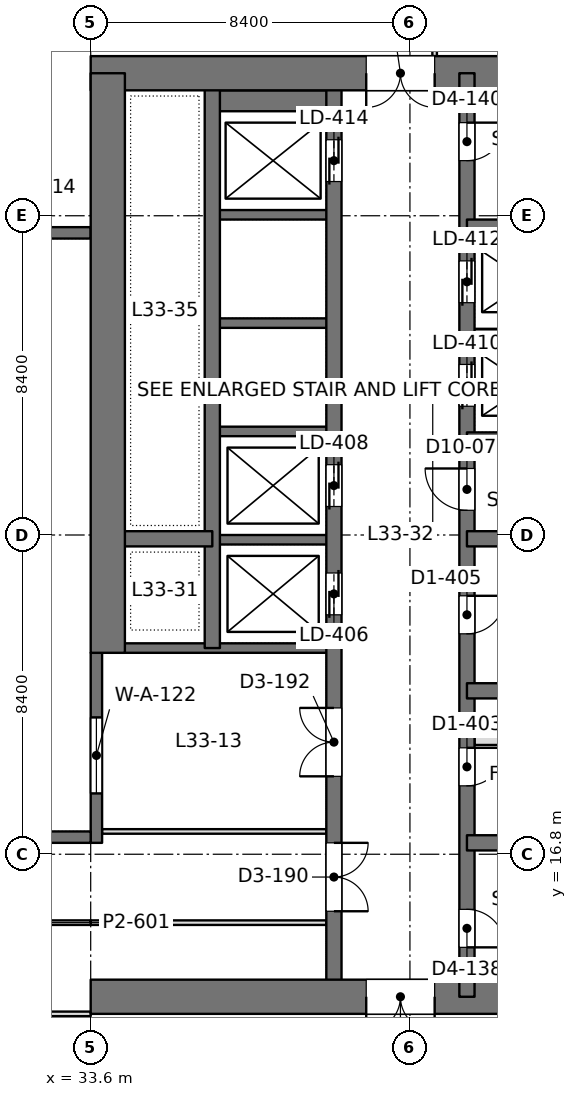
"""IFC4 building model, lengths in metres.
Left out: names, types, materials, properties, quantities, classifications, styles, units other than length and angle.
Written with IfcOpenShell. Run it as: python <this file> out.ifc"""

import sys

from ifc_helpers import new_model, si_unit, direction, frame, frame_2d, origin, place, context, subcontext, project, spatial, rectangle, extrude, element, fill, save


model = new_model("IFC4")
c1 = context("Model", 3, precision=1e-05, world=origin(), true_north=direction((0.0, 1.0)))
c2 = subcontext(c1, "Body", "Model", "MODEL_VIEW")
j1 = project(units=[si_unit("LENGTHUNIT", "METRE"), si_unit("PLANEANGLEUNIT", "RADIAN")], contexts=[c1])
p1 = place(None, origin())
s1 = spatial("IfcSite", under=j1, at=p1, CompositionType="ELEMENT")
p2 = place(p1, origin())
s2 = spatial("IfcBuilding", under=s1, at=p2, CompositionType="ELEMENT")
p3 = place(p2, frame((0.0, 0.0, 147.0)))
s3 = spatial("IfcBuildingStorey", under=s2, at=p3, CompositionType="ELEMENT", Elevation=147.0)
p4 = place(p3, frame((33.6, 13.05, 0.0), z_axis=(0.0, 0.0, 1.0), x_axis=(1.0, 0.0, 0.0)))
e1 = element("IfcWall", 1, at=p4, inside=s3, PredefinedType="SHEAR", context=c2, shape_type="SweptSolid", body=[
    extrude(rectangle(XDim=18.0, YDim=0.9, at=frame_2d((9.0, 0.0))), origin(), (0.0, 0.0, 1.0), 4.2),
])
p5 = place(p4, frame((7.25, 0.0, 0.0)))
e2 = element("IfcOpeningElement", 2, at=p5, cuts=e1, PredefinedType="OPENING", context=c2, shape_type="SweptSolid", body=[
    extrude(rectangle(XDim=1.8, YDim=2.4, at=frame_2d((0.9, 1.2))), frame((0.0, 0.46, 0.0), z_axis=(0.0, -1.0, 0.0), x_axis=(1.0, 0.0, 0.0)), (0.0, 0.0, 1.0), 0.92),
])
p6 = place(p3, frame((33.6, 37.35, 0.0), z_axis=(0.0, 0.0, 1.0), x_axis=(1.0, 0.0, 0.0)))
e3 = element("IfcWall", 3, at=p6, inside=s3, PredefinedType="SHEAR", context=c2, shape_type="SweptSolid", body=[
    extrude(rectangle(XDim=18.0, YDim=0.9, at=frame_2d((9.0, 0.0))), origin(), (0.0, 0.0, 1.0), 4.2),
])
p7 = place(p6, frame((7.25, 0.0, 0.0)))
e4 = element("IfcOpeningElement", 4, at=p7, cuts=e3, PredefinedType="OPENING", context=c2, shape_type="SweptSolid", body=[
    extrude(rectangle(XDim=1.8, YDim=2.4, at=frame_2d((0.9, 1.2))), frame((0.0, 0.46, 0.0), z_axis=(0.0, -1.0, 0.0), x_axis=(1.0, 0.0, 0.0)), (0.0, 0.0, 1.0), 0.92),
])
p8 = place(p3, frame((34.05, 22.1, 0.0), z_axis=(0.0, 0.0, 1.0), x_axis=(0.0, 1.0, 0.0)))
e5 = element("IfcWall", 5, at=p8, inside=s3, PredefinedType="SHEAR", context=c2, shape_type="SweptSolid", body=[
    extrude(rectangle(XDim=15.25, YDim=0.9, at=frame_2d((7.625, 0.0))), origin(), (0.0, 0.0, 1.0), 4.2),
])
p9 = place(p3, frame((43.5, 13.05, 0.0), z_axis=(0.0, 0.0, 1.0), x_axis=(0.0, 1.0, 0.0)))
e6 = element("IfcWall", 6, at=p9, inside=s3, PredefinedType="SHEAR", context=c2, shape_type="SweptSolid", body=[
    extrude(rectangle(XDim=24.3, YDim=0.4, at=frame_2d((12.15, 0.0))), origin(), (0.0, 0.0, 1.0), 4.2),
])
p10 = place(p9, frame((1.3, 0.0, 0.0)))
e7 = element("IfcOpeningElement", 7, at=p10, cuts=e6, PredefinedType="OPENING", context=c2, shape_type="SweptSolid", body=[
    extrude(rectangle(XDim=1.0, YDim=2.2, at=frame_2d((0.5, 1.1))), frame((0.0, 0.21, 0.0), z_axis=(0.0, -1.0, 0.0), x_axis=(1.0, 0.0, 0.0)), (0.0, 0.0, 1.0), 0.42),
])
p11 = place(p9, frame((22.0, 0.0, 0.0)))
e8 = element("IfcOpeningElement", 8, at=p11, cuts=e6, PredefinedType="OPENING", context=c2, shape_type="SweptSolid", body=[
    extrude(rectangle(XDim=1.0, YDim=2.2, at=frame_2d((0.5, 1.1))), frame((0.0, 0.21, 0.0), z_axis=(0.0, -1.0, 0.0), x_axis=(1.0, 0.0, 0.0)), (0.0, 0.0, 1.0), 0.42),
])
p12 = place(p9, frame((5.55, 0.0, 0.0)))
e9 = element("IfcOpeningElement", 9, at=p12, cuts=e6, PredefinedType="OPENING", context=c2, shape_type="SweptSolid", body=[
    extrude(rectangle(XDim=1.0, YDim=2.2, at=frame_2d((0.5, 1.1))), frame((0.0, 0.21, 0.0), z_axis=(0.0, -1.0, 0.0), x_axis=(1.0, 0.0, 0.0)), (0.0, 0.0, 1.0), 0.42),
])
p13 = place(p9, frame((9.55, 0.0, 0.0)))
e10 = element("IfcOpeningElement", 10, at=p13, cuts=e6, PredefinedType="OPENING", context=c2, shape_type="SweptSolid", body=[
    extrude(rectangle(XDim=1.0, YDim=2.2, at=frame_2d((0.5, 1.1))), frame((0.0, 0.21, 0.0), z_axis=(0.0, -1.0, 0.0), x_axis=(1.0, 0.0, 0.0)), (0.0, 0.0, 1.0), 0.42),
])
p14 = place(p9, frame((12.8, 0.0, 0.0)))
e11 = element("IfcOpeningElement", 11, at=p14, cuts=e6, PredefinedType="OPENING", context=c2, shape_type="SweptSolid", body=[
    extrude(rectangle(XDim=1.1, YDim=2.2, at=frame_2d((0.55, 1.1))), frame((0.0, 0.21, 0.0), z_axis=(0.0, -1.0, 0.0), x_axis=(1.0, 0.0, 0.0)), (0.0, 0.0, 1.0), 0.42),
])
p15 = place(p9, frame((15.538, 0.0, 0.0)))
e12 = element("IfcOpeningElement", 12, at=p15, cuts=e6, PredefinedType="OPENING", context=c2, shape_type="SweptSolid", body=[
    extrude(rectangle(XDim=1.1, YDim=2.2, at=frame_2d((0.55, 1.1))), frame((0.0, 0.21, 0.0), z_axis=(0.0, -1.0, 0.0), x_axis=(1.0, 0.0, 0.0)), (0.0, 0.0, 1.0), 0.42),
])
p16 = place(p9, frame((18.262, 0.0, 0.0)))
e13 = element("IfcOpeningElement", 13, at=p16, cuts=e6, PredefinedType="OPENING", context=c2, shape_type="SweptSolid", body=[
    extrude(rectangle(XDim=1.1, YDim=2.2, at=frame_2d((0.55, 1.1))), frame((0.0, 0.21, 0.0), z_axis=(0.0, -1.0, 0.0), x_axis=(1.0, 0.0, 0.0)), (0.0, 0.0, 1.0), 0.42),
])
p17 = place(p3, frame((40.0, 13.05, 0.0), z_axis=(0.0, 0.0, 1.0), x_axis=(0.0, 1.0, 0.0)))
e14 = element("IfcWall", 14, at=p17, inside=s3, PredefinedType="SHEAR", context=c2, shape_type="SweptSolid", body=[
    extrude(rectangle(XDim=24.3, YDim=0.4, at=frame_2d((12.15, 0.0))), origin(), (0.0, 0.0, 1.0), 4.2),
])
p18 = place(p17, frame((10.05, 0.0, 0.0)))
e15 = element("IfcOpeningElement", 15, at=p18, cuts=e14, PredefinedType="OPENING", context=c2, shape_type="SweptSolid", body=[
    extrude(rectangle(XDim=1.1, YDim=2.2, at=frame_2d((0.55, 1.1))), frame((0.0, 0.21, 0.0), z_axis=(0.0, -1.0, 0.0), x_axis=(1.0, 0.0, 0.0)), (0.0, 0.0, 1.0), 0.42),
])
p19 = place(p17, frame((12.9, 0.0, 0.0)))
e16 = element("IfcOpeningElement", 16, at=p19, cuts=e14, PredefinedType="OPENING", context=c2, shape_type="SweptSolid", body=[
    extrude(rectangle(XDim=1.1, YDim=2.2, at=frame_2d((0.55, 1.1))), frame((0.0, 0.21, 0.0), z_axis=(0.0, -1.0, 0.0), x_axis=(1.0, 0.0, 0.0)), (0.0, 0.0, 1.0), 0.42),
])
p20 = place(p17, frame((21.45, 0.0, 0.0)))
e17 = element("IfcOpeningElement", 17, at=p20, cuts=e14, PredefinedType="OPENING", context=c2, shape_type="SweptSolid", body=[
    extrude(rectangle(XDim=1.1, YDim=2.2, at=frame_2d((0.55, 1.1))), frame((0.0, 0.21, 0.0), z_axis=(0.0, -1.0, 0.0), x_axis=(1.0, 0.0, 0.0)), (0.0, 0.0, 1.0), 0.42),
])
p21 = place(p17, frame((2.25, 0.0, 0.0)))
e18 = element("IfcOpeningElement", 18, at=p21, cuts=e14, PredefinedType="OPENING", context=c2, shape_type="SweptSolid", body=[
    extrude(rectangle(XDim=1.8, YDim=2.4, at=frame_2d((0.9, 1.2))), frame((0.0, 0.21, 0.0), z_axis=(0.0, -1.0, 0.0), x_axis=(1.0, 0.0, 0.0)), (0.0, 0.0, 1.0), 0.42),
])
p22 = place(p17, frame((5.8, 0.0, 0.0)))
e19 = element("IfcOpeningElement", 19, at=p22, cuts=e14, PredefinedType="OPENING", context=c2, shape_type="SweptSolid", body=[
    extrude(rectangle(XDim=1.8, YDim=2.4, at=frame_2d((0.9, 1.2))), frame((0.0, 0.21, 0.0), z_axis=(0.0, -1.0, 0.0), x_axis=(1.0, 0.0, 0.0)), (0.0, 0.0, 1.0), 0.42),
])
p23 = place(p3, frame((36.8, 22.225, 0.0), z_axis=(0.0, 0.0, 1.0), x_axis=(0.0, 1.0, 0.0)))
e20 = element("IfcWall", 20, at=p23, inside=s3, PredefinedType="SHEAR", context=c2, shape_type="SweptSolid", body=[
    extrude(rectangle(XDim=15.125, YDim=0.4, at=frame_2d((7.562, 0.0))), origin(), (0.0, 0.0, 1.0), 4.2),
])
for number, where, z_axis, x_axis in (
    (21, (51.15, 17.1, 0.0), (0.0, 0.0, 1.0), (-1.0, 0.0, 0.0)),
    (22, (51.15, 21.1, 0.0), (0.0, 0.0, 1.0), (-1.0, 0.0, 0.0)),
    (23, (51.15, 25.1, 0.0), (0.0, 0.0, 1.0), (-1.0, 0.0, 0.0)),
    (24, (51.15, 27.7, 0.0), (0.0, 0.0, 1.0), (-1.0, 0.0, 0.0)),
    (25, (51.15, 33.3, 0.0), (0.0, 0.0, 1.0), (-1.0, 0.0, 0.0)),
):
    element("IfcWall", number, at=place(p3, frame(where, z_axis=z_axis, x_axis=x_axis)), inside=s3, PredefinedType="SHEAR", context=c2, shape_type="SweptSolid", body=[
        extrude(rectangle(XDim=7.65, YDim=0.4, at=frame_2d((3.825, 0.0))), origin(), (0.0, 0.0, 1.0), 4.2),
    ])
p24 = place(p3, frame((46.7, 30.5, 0.0), z_axis=(0.0, 0.0, 1.0), x_axis=(-1.0, 0.0, 0.0)))
e26 = element("IfcWall", 26, at=p24, inside=s3, PredefinedType="SHEAR", context=c2, shape_type="SweptSolid", body=[
    extrude(rectangle(XDim=3.2, YDim=0.25, at=frame_2d((1.6, 0.0))), origin(), (0.0, 0.0, 1.0), 4.2),
])
p25 = place(p3, frame((36.8, 25.1, 0.0), z_axis=(0.0, 0.0, 1.0), x_axis=(-1.0, 0.0, 0.0)))
e27 = element("IfcWall", 27, at=p25, inside=s3, PredefinedType="SHEAR", context=c2, shape_type="SweptSolid", body=[
    extrude(rectangle(XDim=2.75, YDim=0.4, at=frame_2d((1.375, 0.0))), origin(), (0.0, 0.0, 1.0), 4.2),
])
p26 = place(p3, frame((40.0, 22.225, 0.0), z_axis=(0.0, 0.0, 1.0), x_axis=(-1.0, 0.0, 0.0)))
e28 = element("IfcWall", 28, at=p26, inside=s3, PredefinedType="SHEAR", context=c2, shape_type="SweptSolid", body=[
    extrude(rectangle(XDim=5.95, YDim=0.25, at=frame_2d((2.975, 0.0))), origin(), (0.0, 0.0, 1.0), 4.2),
])
for number, where, z_axis, x_axis in (
    (29, (40.0, 25.075, 0.0), (0.0, 0.0, 1.0), (-1.0, 0.0, 0.0)),
    (30, (40.0, 27.925, 0.0), (0.0, 0.0, 1.0), (-1.0, 0.0, 0.0)),
    (31, (40.0, 30.775, 0.0), (0.0, 0.0, 1.0), (-1.0, 0.0, 0.0)),
    (32, (40.0, 33.625, 0.0), (0.0, 0.0, 1.0), (-1.0, 0.0, 0.0)),
):
    element("IfcWall", number, at=place(p3, frame(where, z_axis=z_axis, x_axis=x_axis)), inside=s3, PredefinedType="SHEAR", context=c2, shape_type="SweptSolid", body=[
        extrude(rectangle(XDim=3.2, YDim=0.25, at=frame_2d((1.6, 0.0))), origin(), (0.0, 0.0, 1.0), 4.2),
    ])
p27 = place(p3, frame((40.0, 36.625, 0.0), z_axis=(0.0, 0.0, 1.0), x_axis=(-1.0, 0.0, 0.0)))
e33 = element("IfcWall", 33, at=p27, inside=s3, PredefinedType="SHEAR", context=c2, shape_type="SweptSolid", body=[
    extrude(rectangle(XDim=3.2, YDim=0.55, at=frame_2d((1.6, 0.0))), origin(), (0.0, 0.0, 1.0), 4.2),
])
p28 = place(p3, frame((33.75, 17.1, 0.0), z_axis=(0.0, 0.0, 1.0), x_axis=(0.0, 1.0, 0.0)))
e34 = element("IfcWall", 34, at=p28, inside=s3, PredefinedType="SOLIDWALL", context=c2, shape_type="SweptSolid", body=[
    extrude(rectangle(XDim=5.0, YDim=0.3, at=frame_2d((2.5, 0.0))), origin(), (0.0, 0.0, 1.0), 4.05),
])
p29 = place(p28, frame((1.3, 0.0, 0.1)))
e35 = element("IfcOpeningElement", 35, at=p29, cuts=e34, PredefinedType="OPENING", context=c2, shape_type="SweptSolid", body=[
    extrude(rectangle(XDim=2.0, YDim=3.0, at=frame_2d((1.0, 1.5))), frame((0.0, 0.16, 0.0), z_axis=(0.0, -1.0, 0.0), x_axis=(1.0, 0.0, 0.0)), (0.0, 0.0, 1.0), 0.32),
])
p30 = place(p3, frame((26.025, 17.25, 0.0), z_axis=(0.0, 0.0, 1.0), x_axis=(1.0, 0.0, 0.0)))
e36 = element("IfcWall", 36, at=p30, inside=s3, PredefinedType="SOLIDWALL", context=c2, shape_type="SweptSolid", body=[
    extrude(rectangle(XDim=7.575, YDim=0.3, at=frame_2d((3.788, 0.0))), origin(), (0.0, 0.0, 1.0), 4.05),
])
p31 = place(p30, frame((0.587, 0.0, 0.1)))
e37 = element("IfcOpeningElement", 37, at=p31, cuts=e36, PredefinedType="OPENING", context=c2, shape_type="SweptSolid", body=[
    extrude(rectangle(XDim=2.0, YDim=3.0, at=frame_2d((1.0, 1.5))), frame((0.0, 0.16, 0.0), z_axis=(0.0, -1.0, 0.0), x_axis=(1.0, 0.0, 0.0)), (0.0, 0.0, 1.0), 0.32),
])
p32 = place(p30, frame((4.188, 0.0, 0.1)))
e38 = element("IfcOpeningElement", 38, at=p32, cuts=e36, PredefinedType="OPENING", context=c2, shape_type="SweptSolid", body=[
    extrude(rectangle(XDim=2.0, YDim=3.0, at=frame_2d((1.0, 1.5))), frame((0.0, 0.16, 0.0), z_axis=(0.0, -1.0, 0.0), x_axis=(1.0, 0.0, 0.0)), (0.0, 0.0, 1.0), 0.32),
])
p33 = place(p3, frame((26.025, 33.15, 0.0), z_axis=(0.0, 0.0, 1.0), x_axis=(1.0, 0.0, 0.0)))
e39 = element("IfcWall", 39, at=p33, inside=s3, PredefinedType="SOLIDWALL", context=c2, shape_type="SweptSolid", body=[
    extrude(rectangle(XDim=7.575, YDim=0.3, at=frame_2d((3.788, 0.0))), origin(), (0.0, 0.0, 1.0), 4.05),
])
p34 = place(p33, frame((0.587, 0.0, 0.1)))
e40 = element("IfcOpeningElement", 40, at=p34, cuts=e39, PredefinedType="OPENING", context=c2, shape_type="SweptSolid", body=[
    extrude(rectangle(XDim=2.0, YDim=3.0, at=frame_2d((1.0, 1.5))), frame((0.0, 0.16, 0.0), z_axis=(0.0, -1.0, 0.0), x_axis=(1.0, 0.0, 0.0)), (0.0, 0.0, 1.0), 0.32),
])
p35 = place(p33, frame((4.188, 0.0, 0.1)))
e41 = element("IfcOpeningElement", 41, at=p35, cuts=e39, PredefinedType="OPENING", context=c2, shape_type="SweptSolid", body=[
    extrude(rectangle(XDim=2.0, YDim=3.0, at=frame_2d((1.0, 1.5))), frame((0.0, 0.16, 0.0), z_axis=(0.0, -1.0, 0.0), x_axis=(1.0, 0.0, 0.0)), (0.0, 0.0, 1.0), 0.32),
])
p36 = place(p3, frame((33.898, 17.4, 0.0), z_axis=(0.0, 0.0, 1.0), x_axis=(1.0, 0.0, 0.0)))
e42 = element("IfcWall", 42, at=p36, inside=s3, PredefinedType="PARTITIONING", context=c2, shape_type="SweptSolid", body=[
    extrude(rectangle(XDim=5.904, YDim=0.12, at=frame_2d((2.952, 0.0))), origin(), (0.0, 0.0, 1.0), 3.55),
])
p37 = place(p3, frame((33.598, 15.0, 0.0), z_axis=(0.0, 0.0, 1.0), x_axis=(1.0, 0.0, 0.0)))
e43 = element("IfcWall", 43, at=p37, inside=s3, PredefinedType="PARTITIONING", context=c2, shape_type="SweptSolid", body=[
    extrude(rectangle(XDim=6.204, YDim=0.12, at=frame_2d((3.102, 0.0))), origin(), (0.0, 0.0, 1.0), 3.55),
])
p38 = place(p3, frame((16.798, 15.0, 0.0), z_axis=(0.0, 0.0, 1.0), x_axis=(1.0, 0.0, 0.0)))
e44 = element("IfcWall", 44, at=p38, inside=s3, PredefinedType="PARTITIONING", context=c2, shape_type="SweptSolid", body=[
    extrude(rectangle(XDim=16.804, YDim=0.12, at=frame_2d((8.402, 0.0))), origin(), (0.0, 0.0, 1.0), 3.55),
])
p39 = place(p38, frame((4.702, 0.0, 0.0)))
e45 = element("IfcOpeningElement", 45, at=p39, cuts=e44, PredefinedType="OPENING", context=c2, shape_type="SweptSolid", body=[
    extrude(rectangle(XDim=1.8, YDim=2.2, at=frame_2d((0.9, 1.1))), frame((0.0, 0.07, 0.0), z_axis=(0.0, -1.0, 0.0), x_axis=(1.0, 0.0, 0.0)), (0.0, 0.0, 1.0), 0.14),
])
p40 = place(p3, frame((16.8, 12.6, 0.0), z_axis=(0.0, 0.0, 1.0), x_axis=(1.0, 0.0, 0.0)))
e46 = element("IfcWall", 46, at=p40, inside=s3, PredefinedType="PARTITIONING", context=c2, shape_type="SweptSolid", body=[
    extrude(rectangle(XDim=16.8, YDim=0.12, at=frame_2d((8.4, 0.0))), origin(), (0.0, 0.0, 1.0), 3.55),
])
p41 = place(p3, frame((42.65, 37.8, 0.0), z_axis=(0.0, 0.0, 1.0), x_axis=(0.0, 1.0, 0.0)))
e47 = element("IfcWall", 47, at=p41, inside=s3, PredefinedType="PARTITIONING", context=c2, shape_type="SweptSolid", body=[
    extrude(rectangle(XDim=2.0, YDim=0.12, at=frame_2d((1.0, 0.0))), origin(), (0.0, 0.0, 1.0), 4.05),
])
p42 = place(p3, frame((43.7, 19.8, 0.0), z_axis=(0.0, 0.0, 1.0), x_axis=(1.0, 0.0, 0.0)))
e48 = element("IfcWall", 48, at=p42, inside=s3, PredefinedType="PARTITIONING", context=c2, shape_type="SweptSolid", body=[
    extrude(rectangle(XDim=6.6, YDim=0.25, at=frame_2d((3.3, 0.0))), origin(), (0.0, 0.0, 1.0), 4.0),
])
p43 = place(p42, frame((2.825, 0.0, 0.0)))
e49 = element("IfcOpeningElement", 49, at=p43, cuts=e48, PredefinedType="OPENING", context=c2, shape_type="SweptSolid", body=[
    extrude(rectangle(XDim=0.9, YDim=2.2, at=frame_2d((0.45, 1.1))), frame((0.0, 0.135, 0.0), z_axis=(0.0, -1.0, 0.0), x_axis=(1.0, 0.0, 0.0)), (0.0, 0.0, 1.0), 0.27),
])
p44 = place(p29, origin())
e50 = element("IfcWindow", 50, at=p44, inside=s3, PartitioningType="SINGLE_PANEL", PredefinedType="WINDOW", context=c2, shape_type="SweptSolid", body=[
    extrude(rectangle(XDim=2.0, YDim=3.0, at=frame_2d((1.0, 1.5))), frame((0.0, 0.03, 0.0), z_axis=(0.0, -1.0, 0.0), x_axis=(1.0, 0.0, 0.0)), (0.0, 0.0, 1.0), 0.06),
])
fill(e35, e50)
p45 = place(p5, frame((1.8, 0.0, 0.0), z_axis=(0.0, 0.0, 1.0), x_axis=(-1.0, 0.0, 0.0)))
e51 = element("IfcDoor", 51, at=p45, inside=s3, OperationType="DOUBLE_DOOR_SINGLE_SWING", PredefinedType="DOOR", context=c2, shape_type="SweptSolid", body=[
    extrude(rectangle(XDim=1.8, YDim=2.4, at=frame_2d((0.9, 1.2))), frame((0.0, 0.025, 0.0), z_axis=(0.0, -1.0, 0.0), x_axis=(1.0, 0.0, 0.0)), (0.0, 0.0, 1.0), 0.05),
])
fill(e2, e51)
p46 = place(p7, frame((1.8, 0.0, 0.0), z_axis=(0.0, 0.0, 1.0), x_axis=(-1.0, 0.0, 0.0)))
e52 = element("IfcDoor", 52, at=p46, inside=s3, OperationType="DOUBLE_DOOR_SINGLE_SWING", PredefinedType="DOOR", context=c2, shape_type="SweptSolid", body=[
    extrude(rectangle(XDim=1.8, YDim=2.4, at=frame_2d((0.9, 1.2))), frame((0.0, 0.025, 0.0), z_axis=(0.0, -1.0, 0.0), x_axis=(1.0, 0.0, 0.0)), (0.0, 0.0, 1.0), 0.05),
])
fill(e4, e52)
p47 = place(p10, frame((1.0, 0.0, 0.0), z_axis=(0.0, 0.0, 1.0), x_axis=(-1.0, 0.0, 0.0)))
e53 = element("IfcDoor", 53, at=p47, inside=s3, OperationType="SINGLE_SWING_RIGHT", PredefinedType="DOOR", context=c2, shape_type="SweptSolid", body=[
    extrude(rectangle(XDim=1.0, YDim=2.2, at=frame_2d((0.5, 1.1))), frame((0.0, 0.025, 0.0), z_axis=(0.0, -1.0, 0.0), x_axis=(1.0, 0.0, 0.0)), (0.0, 0.0, 1.0), 0.05),
])
fill(e7, e53)
p48 = place(p11, frame((1.0, 0.0, 0.0), z_axis=(0.0, 0.0, 1.0), x_axis=(-1.0, 0.0, 0.0)))
e54 = element("IfcDoor", 54, at=p48, inside=s3, OperationType="SINGLE_SWING_LEFT", PredefinedType="DOOR", context=c2, shape_type="SweptSolid", body=[
    extrude(rectangle(XDim=1.0, YDim=2.2, at=frame_2d((0.5, 1.1))), frame((0.0, 0.025, 0.0), z_axis=(0.0, -1.0, 0.0), x_axis=(1.0, 0.0, 0.0)), (0.0, 0.0, 1.0), 0.05),
])
fill(e8, e54)
p49 = place(p12, frame((1.0, 0.0, 0.0), z_axis=(0.0, 0.0, 1.0), x_axis=(-1.0, 0.0, 0.0)))
e55 = element("IfcDoor", 55, at=p49, inside=s3, OperationType="SINGLE_SWING_LEFT", PredefinedType="DOOR", context=c2, shape_type="SweptSolid", body=[
    extrude(rectangle(XDim=1.0, YDim=2.2, at=frame_2d((0.5, 1.1))), frame((0.0, 0.025, 0.0), z_axis=(0.0, -1.0, 0.0), x_axis=(1.0, 0.0, 0.0)), (0.0, 0.0, 1.0), 0.05),
])
fill(e9, e55)
p50 = place(p13, frame((1.0, 0.0, 0.0), z_axis=(0.0, 0.0, 1.0), x_axis=(-1.0, 0.0, 0.0)))
e56 = element("IfcDoor", 56, at=p50, inside=s3, OperationType="SINGLE_SWING_LEFT", PredefinedType="DOOR", context=c2, shape_type="SweptSolid", body=[
    extrude(rectangle(XDim=1.0, YDim=2.2, at=frame_2d((0.5, 1.1))), frame((0.0, 0.025, 0.0), z_axis=(0.0, -1.0, 0.0), x_axis=(1.0, 0.0, 0.0)), (0.0, 0.0, 1.0), 0.05),
])
fill(e10, e56)
p51 = place(p14, origin())
e57 = element("IfcDoor", 57, at=p51, inside=s3, OperationType="SINGLE_SWING_RIGHT", PredefinedType="DOOR", context=c2, shape_type="SweptSolid", body=[
    extrude(rectangle(XDim=1.1, YDim=2.2, at=frame_2d((0.55, 1.1))), frame((0.0, 0.025, 0.0), z_axis=(0.0, -1.0, 0.0), x_axis=(1.0, 0.0, 0.0)), (0.0, 0.0, 1.0), 0.05),
])
fill(e11, e57)
p52 = place(p18, origin())
e58 = element("IfcDoor", 58, at=p52, inside=s3, OperationType="DOUBLE_DOOR_SLIDING", PredefinedType="DOOR", context=c2, shape_type="SweptSolid", body=[
    extrude(rectangle(XDim=1.1, YDim=2.2, at=frame_2d((0.55, 1.1))), frame((0.0, 0.025, 0.0), z_axis=(0.0, -1.0, 0.0), x_axis=(1.0, 0.0, 0.0)), (0.0, 0.0, 1.0), 0.05),
])
fill(e15, e58)
p53 = place(p19, origin())
e59 = element("IfcDoor", 59, at=p53, inside=s3, OperationType="DOUBLE_DOOR_SLIDING", PredefinedType="DOOR", context=c2, shape_type="SweptSolid", body=[
    extrude(rectangle(XDim=1.1, YDim=2.2, at=frame_2d((0.55, 1.1))), frame((0.0, 0.025, 0.0), z_axis=(0.0, -1.0, 0.0), x_axis=(1.0, 0.0, 0.0)), (0.0, 0.0, 1.0), 0.05),
])
fill(e16, e59)
p54 = place(p20, origin())
e60 = element("IfcDoor", 60, at=p54, inside=s3, OperationType="DOUBLE_DOOR_SLIDING", PredefinedType="DOOR", context=c2, shape_type="SweptSolid", body=[
    extrude(rectangle(XDim=1.1, YDim=2.2, at=frame_2d((0.55, 1.1))), frame((0.0, 0.025, 0.0), z_axis=(0.0, -1.0, 0.0), x_axis=(1.0, 0.0, 0.0)), (0.0, 0.0, 1.0), 0.05),
])
fill(e17, e60)
p55 = place(p15, origin())
e61 = element("IfcDoor", 61, at=p55, inside=s3, OperationType="DOUBLE_DOOR_SLIDING", PredefinedType="DOOR", context=c2, shape_type="SweptSolid", body=[
    extrude(rectangle(XDim=1.1, YDim=2.2, at=frame_2d((0.55, 1.1))), frame((0.0, 0.025, 0.0), z_axis=(0.0, -1.0, 0.0), x_axis=(1.0, 0.0, 0.0)), (0.0, 0.0, 1.0), 0.05),
])
fill(e12, e61)
p56 = place(p16, origin())
e62 = element("IfcDoor", 62, at=p56, inside=s3, OperationType="DOUBLE_DOOR_SLIDING", PredefinedType="DOOR", context=c2, shape_type="SweptSolid", body=[
    extrude(rectangle(XDim=1.1, YDim=2.2, at=frame_2d((0.55, 1.1))), frame((0.0, 0.025, 0.0), z_axis=(0.0, -1.0, 0.0), x_axis=(1.0, 0.0, 0.0)), (0.0, 0.0, 1.0), 0.05),
])
fill(e13, e62)
p57 = place(p21, frame((1.8, 0.0, 0.0), z_axis=(0.0, 0.0, 1.0), x_axis=(-1.0, 0.0, 0.0)))
e63 = element("IfcDoor", 63, at=p57, inside=s3, OperationType="DOUBLE_DOOR_SINGLE_SWING", PredefinedType="DOOR", context=c2, shape_type="SweptSolid", body=[
    extrude(rectangle(XDim=1.8, YDim=2.4, at=frame_2d((0.9, 1.2))), frame((0.0, 0.025, 0.0), z_axis=(0.0, -1.0, 0.0), x_axis=(1.0, 0.0, 0.0)), (0.0, 0.0, 1.0), 0.05),
])
fill(e18, e63)
p58 = place(p22, origin())
e64 = element("IfcDoor", 64, at=p58, inside=s3, OperationType="DOUBLE_DOOR_SINGLE_SWING", PredefinedType="DOOR", context=c2, shape_type="SweptSolid", body=[
    extrude(rectangle(XDim=1.8, YDim=2.4, at=frame_2d((0.9, 1.2))), frame((0.0, 0.025, 0.0), z_axis=(0.0, -1.0, 0.0), x_axis=(1.0, 0.0, 0.0)), (0.0, 0.0, 1.0), 0.05),
])
fill(e19, e64)
save(model, sys.argv[1])
